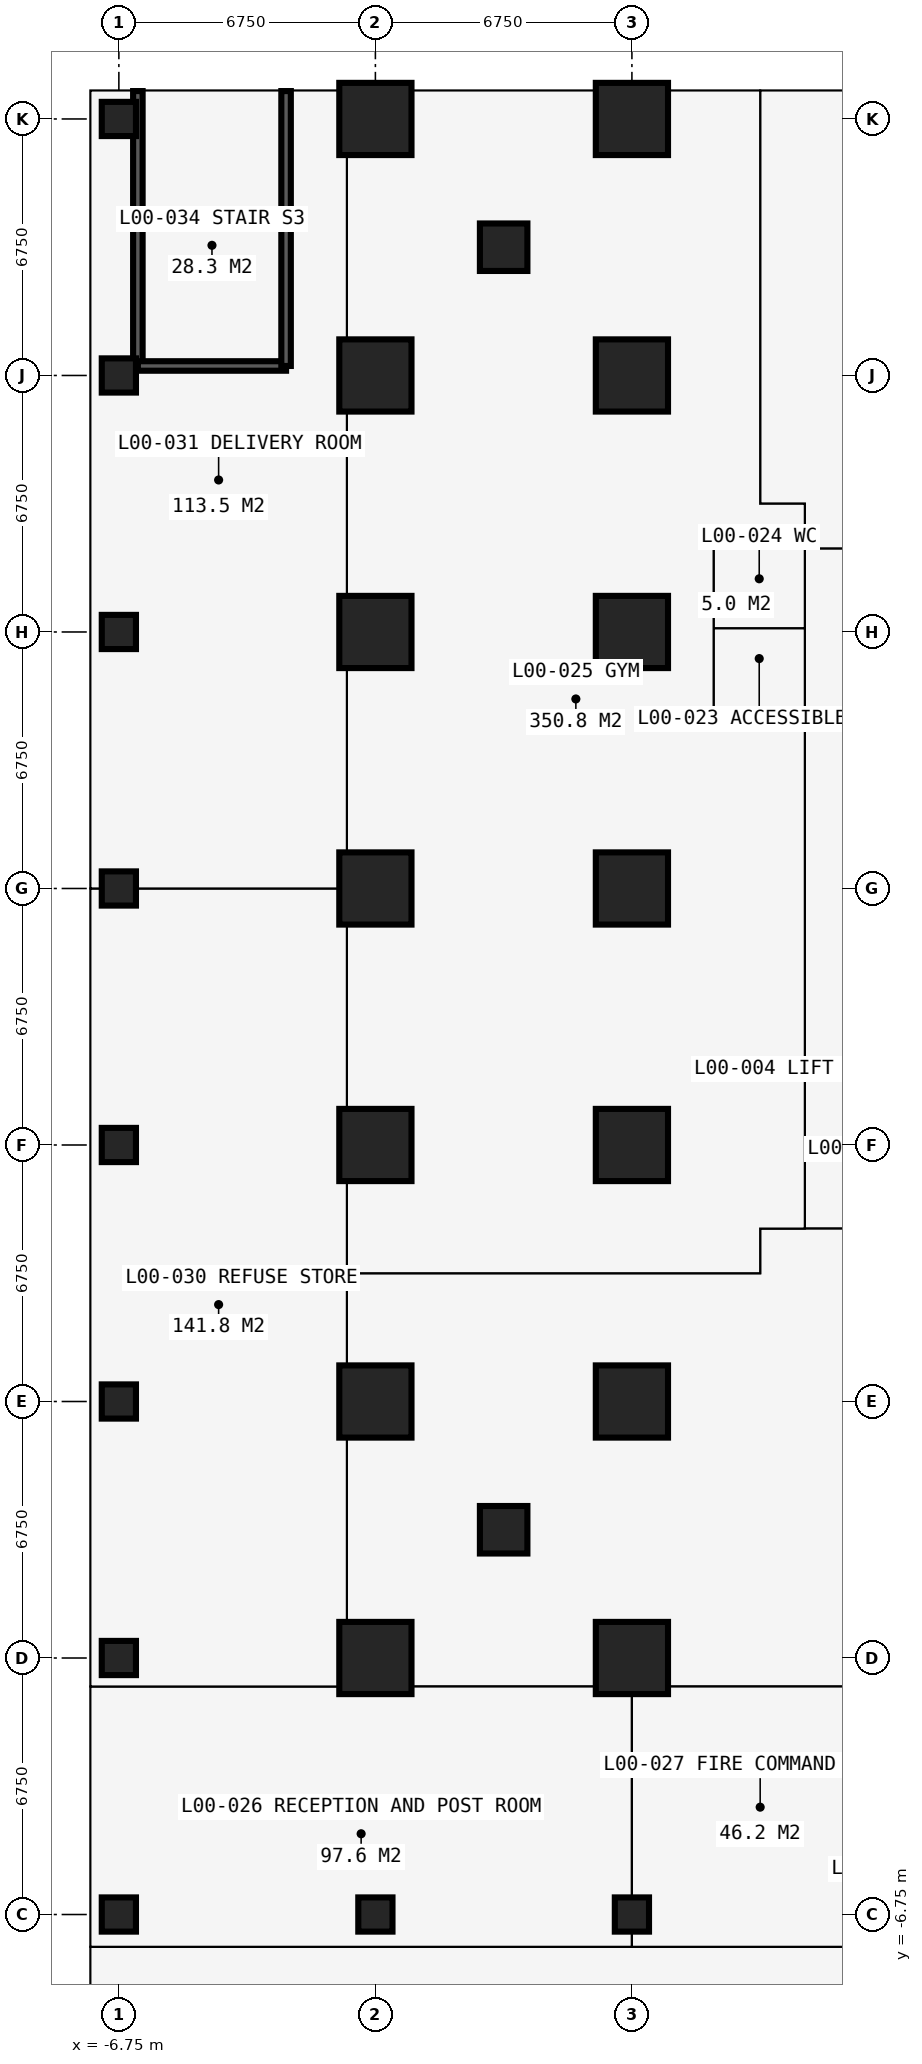
"""IFC4 building model, lengths in metres.
Left out: names, types, materials, properties, quantities, classifications, styles, units other than length and angle.
Written with IfcOpenShell. Run it as: python <this file> out.ifc"""

import sys

from ifc_helpers import new_model, si_unit, direction, frame, frame_2d, origin, origin_2d, place, context, subcontext, project, spatial, rectangle, circle, extrude, element, fill, save


model = new_model("IFC4")
c1 = context("Model", 3, precision=1e-05, world=origin(), true_north=direction((0.0, 1.0)))
c2 = subcontext(c1, "Body", "Model", "MODEL_VIEW")
j1 = project(units=[si_unit("LENGTHUNIT", "METRE"), si_unit("PLANEANGLEUNIT", "RADIAN")], contexts=[c1])
p1 = place(None, origin())
s1 = spatial("IfcSite", under=j1, at=p1, CompositionType="ELEMENT")
p2 = place(p1, origin())
s2 = spatial("IfcBuilding", under=s1, at=p2, CompositionType="ELEMENT")
p3 = place(p2, origin())
s3 = spatial("IfcBuildingStorey", under=s2, at=p3, CompositionType="ELEMENT", Elevation=0.0)
for number, where, z_axis, x_axis in (
    (1, (-6.75, -6.75, 0.0), (0.0, 0.0, 1.0), (1.0, 0.0, 0.0)),
    (2, (-6.75, 0.0, 0.0), (0.0, 0.0, 1.0), (1.0, 0.0, 0.0)),
    (3, (-6.75, 6.75, 0.0), (0.0, 0.0, 1.0), (1.0, 0.0, 0.0)),
    (4, (-6.75, 13.5, 0.0), (0.0, 0.0, 1.0), (1.0, 0.0, 0.0)),
    (5, (-6.75, 20.25, 0.0), (0.0, 0.0, 1.0), (1.0, 0.0, 0.0)),
    (6, (-6.75, 27.0, 0.0), (0.0, 0.0, 1.0), (1.0, 0.0, 0.0)),
    (7, (-6.75, 33.75, 0.0), (0.0, 0.0, 1.0), (1.0, 0.0, 0.0)),
    (8, (-6.75, 40.5, 0.0), (0.0, 0.0, 1.0), (1.0, 0.0, 0.0)),
    (9, (0.0, -6.75, 0.0), (0.0, 0.0, 1.0), (1.0, 0.0, 0.0)),
):
    element("IfcColumn", number, at=place(p3, frame(where, z_axis=z_axis, x_axis=x_axis)), inside=s3, PredefinedType="COLUMN", context=c2, shape_type="SweptSolid", body=[
        extrude(circle(Radius=0.45, at=origin_2d()), origin(), (0.0, 0.0, 1.0), 4.5),
    ])
for number, where, z_axis, x_axis in (
    (10, (0.0, 0.0, 0.0), (0.0, 0.0, 1.0), (1.0, 0.0, 0.0)),
    (11, (0.0, 6.75, 0.0), (0.0, 0.0, 1.0), (1.0, 0.0, 0.0)),
    (12, (0.0, 13.5, 0.0), (0.0, 0.0, 1.0), (1.0, 0.0, 0.0)),
    (13, (0.0, 20.25, 0.0), (0.0, 0.0, 1.0), (1.0, 0.0, 0.0)),
    (14, (0.0, 27.0, 0.0), (0.0, 0.0, 1.0), (1.0, 0.0, 0.0)),
    (15, (0.0, 33.75, 0.0), (0.0, 0.0, 1.0), (1.0, 0.0, 0.0)),
    (16, (0.0, 40.5, 0.0), (0.0, 0.0, 1.0), (1.0, 0.0, 0.0)),
):
    element("IfcColumn", number, at=place(p3, frame(where, z_axis=z_axis, x_axis=x_axis)), inside=s3, PredefinedType="COLUMN", context=c2, shape_type="SweptSolid", body=[
        extrude(rectangle(XDim=1.9, YDim=1.9, at=origin_2d()), origin(), (0.0, 0.0, 1.0), 4.5),
    ])
for number, where, z_axis, x_axis in (
    (17, (3.375, 3.375, 0.0), (0.0, 0.0, 1.0), (1.0, 0.0, 0.0)),
    (18, (3.375, 37.125, 0.0), (0.0, 0.0, 1.0), (1.0, 0.0, 0.0)),
):
    element("IfcColumn", number, at=place(p3, frame(where, z_axis=z_axis, x_axis=x_axis)), inside=s3, PredefinedType="COLUMN", context=c2, shape_type="SweptSolid", body=[
        extrude(rectangle(XDim=1.25, YDim=1.25, at=origin_2d()), origin(), (0.0, 0.0, 1.0), 4.5),
    ])
p4 = place(p3, frame((6.75, -6.75, 0.0), z_axis=(0.0, 0.0, 1.0), x_axis=(1.0, 0.0, 0.0)))
e19 = element("IfcColumn", 19, at=p4, inside=s3, PredefinedType="COLUMN", context=c2, shape_type="SweptSolid", body=[
    extrude(circle(Radius=0.45, at=origin_2d()), origin(), (0.0, 0.0, 1.0), 4.5),
])
for number, where, z_axis, x_axis in (
    (20, (6.75, 0.0, 0.0), (0.0, 0.0, 1.0), (1.0, 0.0, 0.0)),
    (21, (6.75, 6.75, 0.0), (0.0, 0.0, 1.0), (1.0, 0.0, 0.0)),
    (22, (6.75, 13.5, 0.0), (0.0, 0.0, 1.0), (1.0, 0.0, 0.0)),
    (23, (6.75, 20.25, 0.0), (0.0, 0.0, 1.0), (1.0, 0.0, 0.0)),
    (24, (6.75, 27.0, 0.0), (0.0, 0.0, 1.0), (1.0, 0.0, 0.0)),
    (25, (6.75, 33.75, 0.0), (0.0, 0.0, 1.0), (1.0, 0.0, 0.0)),
    (26, (6.75, 40.5, 0.0), (0.0, 0.0, 1.0), (1.0, 0.0, 0.0)),
):
    element("IfcColumn", number, at=place(p3, frame(where, z_axis=z_axis, x_axis=x_axis)), inside=s3, PredefinedType="COLUMN", context=c2, shape_type="SweptSolid", body=[
        extrude(rectangle(XDim=1.9, YDim=1.9, at=origin_2d()), origin(), (0.0, 0.0, 1.0), 4.5),
    ])
p5 = place(p3, frame((-7.5, 6.75, 0.0), z_axis=(0.0, 0.0, 1.0), x_axis=(0.0, 1.0, 0.0)))
e27 = element("IfcWall", 27, at=p5, inside=s3, PredefinedType="SOLIDWALL", context=c2, shape_type="SweptSolid", body=[
    extrude(rectangle(XDim=6.75, YDim=0.15, at=frame_2d((3.375, 0.0))), origin(), (0.0, 0.0, 1.0), 4.25),
])
p6 = place(p5, frame((1.875, 0.0, 0.0)))
e28 = element("IfcOpeningElement", 28, at=p6, cuts=e27, PredefinedType="OPENING", context=c2, shape_type="SweptSolid", body=[
    extrude(rectangle(XDim=3.0, YDim=3.0, at=frame_2d((1.5, 1.5))), frame((0.0, 0.085, 0.0), z_axis=(0.0, -1.0, 0.0), x_axis=(1.0, 0.0, 0.0)), (0.0, 0.0, 1.0), 0.17),
])
p7 = place(p3, frame((-7.5, 27.0, 0.0), z_axis=(0.0, 0.0, 1.0), x_axis=(0.0, 1.0, 0.0)))
e29 = element("IfcWall", 29, at=p7, inside=s3, PredefinedType="SOLIDWALL", context=c2, shape_type="SweptSolid", body=[
    extrude(rectangle(XDim=6.75, YDim=0.15, at=frame_2d((3.375, 0.0))), origin(), (0.0, 0.0, 1.0), 4.25),
])
p8 = place(p7, frame((1.875, 0.0, 0.0)))
e30 = element("IfcOpeningElement", 30, at=p8, cuts=e29, PredefinedType="OPENING", context=c2, shape_type="SweptSolid", body=[
    extrude(rectangle(XDim=3.0, YDim=3.0, at=frame_2d((1.5, 1.5))), frame((0.0, 0.085, 0.0), z_axis=(0.0, -1.0, 0.0), x_axis=(1.0, 0.0, 0.0)), (0.0, 0.0, 1.0), 0.17),
])
p9 = place(p3, frame((-7.484, -7.6, 0.0), z_axis=(0.0, 0.0, 1.0), x_axis=(1.0, 0.0, 0.0)))
e31 = element("IfcWall", 31, at=p9, inside=s3, PredefinedType="PARTITIONING", context=c2, shape_type="SweptSolid", body=[
    extrude(rectangle(XDim=20.984, YDim=0.15, at=frame_2d((10.492, 0.0))), origin(), (0.0, 0.0, 1.0), 4.25),
])
p10 = place(p3, frame((-7.484, -0.75, 0.0), z_axis=(0.0, 0.0, 1.0), x_axis=(1.0, 0.0, 0.0)))
e32 = element("IfcWall", 32, at=p10, inside=s3, PredefinedType="PARTITIONING", context=c2, shape_type="SweptSolid", body=[
    extrude(rectangle(XDim=20.984, YDim=0.15, at=frame_2d((10.492, 0.0))), origin(), (0.0, 0.0, 1.0), 4.25),
])
p11 = place(p10, frame((9.684, 0.0, 0.0)))
e33 = element("IfcOpeningElement", 33, at=p11, cuts=e32, PredefinedType="OPENING", context=c2, shape_type="SweptSolid", body=[
    extrude(rectangle(XDim=1.6, YDim=2.4, at=frame_2d((0.8, 1.2))), frame((0.0, 0.085, 0.0), z_axis=(0.0, -1.0, 0.0), x_axis=(1.0, 0.0, 0.0)), (0.0, 0.0, 1.0), 0.17),
])
p12 = place(p3, frame((-7.484, 20.25, 0.0), z_axis=(0.0, 0.0, 1.0), x_axis=(1.0, 0.0, 0.0)))
e34 = element("IfcWall", 34, at=p12, inside=s3, PredefinedType="PARTITIONING", context=c2, shape_type="SweptSolid", body=[
    extrude(rectangle(XDim=6.734, YDim=0.15, at=frame_2d((3.367, 0.0))), origin(), (0.0, 0.0, 1.0), 3.752),
])
p13 = place(p3, frame((-6.25, 34.0, 0.0), z_axis=(0.0, 0.0, 1.0), x_axis=(0.0, 1.0, 0.0)))
e35 = element("IfcWall", 35, at=p13, inside=s3, PredefinedType="SOLIDWALL", context=c2, shape_type="SweptSolid", body=[
    extrude(rectangle(XDim=7.234, YDim=0.25, at=frame_2d((3.617, 0.0))), origin(), (0.0, 0.0, 1.0), 4.25),
])
p14 = place(p3, frame((-6.25, 34.0, 0.0), z_axis=(0.0, 0.0, 1.0), x_axis=(1.0, 0.0, 0.0)))
e36 = element("IfcWall", 36, at=p14, inside=s3, PredefinedType="SOLIDWALL", context=c2, shape_type="SweptSolid", body=[
    extrude(rectangle(XDim=3.9, YDim=0.25, at=frame_2d((1.95, 0.0))), origin(), (0.0, 0.0, 1.0), 4.25),
])
p15 = place(p3, frame((-2.35, 34.0, 0.0), z_axis=(0.0, 0.0, 1.0), x_axis=(0.0, 1.0, 0.0)))
e37 = element("IfcWall", 37, at=p15, inside=s3, PredefinedType="SOLIDWALL", context=c2, shape_type="SweptSolid", body=[
    extrude(rectangle(XDim=7.234, YDim=0.25, at=frame_2d((3.617, 0.0))), origin(), (0.0, 0.0, 1.0), 4.25),
])
p16 = place(p3, frame((-0.75, -0.75, 0.0), z_axis=(0.0, 0.0, 1.0), x_axis=(0.0, 1.0, 0.0)))
e38 = element("IfcWall", 38, at=p16, inside=s3, PredefinedType="PARTITIONING", context=c2, shape_type="SweptSolid", body=[
    extrude(rectangle(XDim=41.984, YDim=0.15, at=frame_2d((20.992, 0.0))), origin(), (0.0, 0.0, 1.0), 4.25),
])
p17 = place(p16, frame((4.95, 0.0, 0.0)))
e39 = element("IfcOpeningElement", 39, at=p17, cuts=e38, PredefinedType="OPENING", context=c2, shape_type="SweptSolid", body=[
    extrude(rectangle(XDim=0.95, YDim=2.2, at=frame_2d((0.475, 1.1))), frame((0.0, 0.085, 0.0), z_axis=(0.0, -1.0, 0.0), x_axis=(1.0, 0.0, 0.0)), (0.0, 0.0, 1.0), 0.17),
])
p18 = place(p16, frame((31.0, 0.0, 0.0)))
e40 = element("IfcOpeningElement", 40, at=p18, cuts=e38, PredefinedType="OPENING", context=c2, shape_type="SweptSolid", body=[
    extrude(rectangle(XDim=0.95, YDim=2.2, at=frame_2d((0.475, 1.1))), frame((0.0, 0.085, 0.0), z_axis=(0.0, -1.0, 0.0), x_axis=(1.0, 0.0, 0.0)), (0.0, 0.0, 1.0), 0.17),
])
p19 = place(p3, frame((-0.75, 10.125, 0.0), z_axis=(0.0, 0.0, 1.0), x_axis=(1.0, 0.0, 0.0)))
e41 = element("IfcWall", 41, at=p19, inside=s3, PredefinedType="PARTITIONING", context=c2, shape_type="SweptSolid", body=[
    extrude(rectangle(XDim=10.875, YDim=0.15, at=frame_2d((5.438, 0.0))), origin(), (0.0, 0.0, 1.0), 4.25),
])
p20 = place(p3, frame((6.75, -7.6, 0.0), z_axis=(0.0, 0.0, 1.0), x_axis=(0.0, 1.0, 0.0)))
e42 = element("IfcWall", 42, at=p20, inside=s3, PredefinedType="PARTITIONING", context=c2, shape_type="SweptSolid", body=[
    extrude(rectangle(XDim=6.85, YDim=0.15, at=frame_2d((3.425, 0.0))), origin(), (0.0, 0.0, 1.0), 3.752),
])
p21 = place(p3, frame((8.9, 25.0, 0.0), z_axis=(0.0, 0.0, 1.0), x_axis=(0.0, 1.0, 0.0)))
e43 = element("IfcWall", 43, at=p21, inside=s3, PredefinedType="PARTITIONING", context=c2, shape_type="SweptSolid", body=[
    extrude(rectangle(XDim=4.2, YDim=0.15, at=frame_2d((2.1, 0.0))), origin(), (0.0, 0.0, 1.0), 4.25),
])
p22 = place(p3, frame((8.9, 25.0, 0.0), z_axis=(0.0, 0.0, 1.0), x_axis=(1.0, 0.0, 0.0)))
e44 = element("IfcWall", 44, at=p22, inside=s3, PredefinedType="PARTITIONING", context=c2, shape_type="SweptSolid", body=[
    extrude(rectangle(XDim=2.4, YDim=0.1, at=frame_2d((1.2, 0.0))), origin(), (0.0, 0.0, 1.0), 4.25),
])
p23 = place(p3, frame((8.9, 27.1, 0.0), z_axis=(0.0, 0.0, 1.0), x_axis=(1.0, 0.0, 0.0)))
e45 = element("IfcWall", 45, at=p23, inside=s3, PredefinedType="PARTITIONING", context=c2, shape_type="SweptSolid", body=[
    extrude(rectangle(XDim=2.4, YDim=0.1, at=frame_2d((1.2, 0.0))), origin(), (0.0, 0.0, 1.0), 3.752),
])
p24 = place(p3, frame((8.9, 29.2, 0.0), z_axis=(0.0, 0.0, 1.0), x_axis=(1.0, 0.0, 0.0)))
e46 = element("IfcWall", 46, at=p24, inside=s3, PredefinedType="PARTITIONING", context=c2, shape_type="SweptSolid", body=[
    extrude(rectangle(XDim=21.475, YDim=0.15, at=frame_2d((10.738, 0.0))), origin(), (0.0, 0.0, 1.0), 4.25),
])
p25 = place(p24, frame((10.55, 0.0, 0.0)))
e47 = element("IfcOpeningElement", 47, at=p25, cuts=e46, PredefinedType="OPENING", context=c2, shape_type="SweptSolid", body=[
    extrude(rectangle(XDim=1.6, YDim=2.4, at=frame_2d((0.8, 1.2))), frame((0.0, 0.085, 0.0), z_axis=(0.0, -1.0, 0.0), x_axis=(1.0, 0.0, 0.0)), (0.0, 0.0, 1.0), 0.17),
])
p26 = place(p3, frame((10.125, 10.125, 0.0), z_axis=(0.0, 0.0, 1.0), x_axis=(0.0, 1.0, 0.0)))
e48 = element("IfcWall", 48, at=p26, inside=s3, PredefinedType="PARTITIONING", context=c2, shape_type="SweptSolid", body=[
    extrude(rectangle(XDim=1.175, YDim=0.15, at=frame_2d((0.587, 0.0))), origin(), (0.0, 0.0, 1.0), 4.25),
])
p27 = place(p3, frame((10.125, 11.3, 0.0), z_axis=(0.0, 0.0, 1.0), x_axis=(1.0, 0.0, 0.0)))
e49 = element("IfcWall", 49, at=p27, inside=s3, PredefinedType="PARTITIONING", context=c2, shape_type="SweptSolid", body=[
    extrude(rectangle(XDim=20.675, YDim=0.15, at=frame_2d((10.337, 0.0))), origin(), (0.0, 0.0, 1.0), 4.25),
])
p28 = place(p27, frame((9.325, 0.0, 0.0)))
e50 = element("IfcOpeningElement", 50, at=p28, cuts=e49, PredefinedType="OPENING", context=c2, shape_type="SweptSolid", body=[
    extrude(rectangle(XDim=1.6, YDim=2.4, at=frame_2d((0.8, 1.2))), frame((0.0, 0.085, 0.0), z_axis=(0.0, -1.0, 0.0), x_axis=(1.0, 0.0, 0.0)), (0.0, 0.0, 1.0), 0.17),
])
p29 = place(p3, frame((10.125, 30.375, 0.0), z_axis=(0.0, 0.0, 1.0), x_axis=(0.0, 1.0, 0.0)))
e51 = element("IfcWall", 51, at=p29, inside=s3, PredefinedType="PARTITIONING", context=c2, shape_type="SweptSolid", body=[
    extrude(rectangle(XDim=10.859, YDim=0.15, at=frame_2d((5.429, 0.0))), origin(), (0.0, 0.0, 1.0), 4.25),
])
p30 = place(p3, frame((10.125, 30.375, 0.0), z_axis=(0.0, 0.0, 1.0), x_axis=(1.0, 0.0, 0.0)))
e52 = element("IfcWall", 52, at=p30, inside=s3, PredefinedType="PARTITIONING", context=c2, shape_type="SweptSolid", body=[
    extrude(rectangle(XDim=1.175, YDim=0.15, at=frame_2d((0.587, 0.0))), origin(), (0.0, 0.0, 1.0), 4.25),
])
p31 = place(p3, frame((11.3, 11.3, 0.0), z_axis=(0.0, 0.0, 1.0), x_axis=(0.0, 1.0, 0.0)))
e53 = element("IfcWall", 53, at=p31, inside=s3, PredefinedType="PARTITIONING", context=c2, shape_type="SweptSolid", body=[
    extrude(rectangle(XDim=19.075, YDim=0.15, at=frame_2d((9.538, 0.0))), origin(), (0.0, 0.0, 1.0), 4.25),
])
p32 = place(p31, frame((14.25, 0.0, 0.0)))
e54 = element("IfcOpeningElement", 54, at=p32, cuts=e53, PredefinedType="OPENING", context=c2, shape_type="SweptSolid", body=[
    extrude(rectangle(XDim=1.0, YDim=2.2, at=frame_2d((0.5, 1.1))), frame((0.0, 0.085, 0.0), z_axis=(0.0, -1.0, 0.0), x_axis=(1.0, 0.0, 0.0)), (0.0, 0.0, 1.0), 0.17),
])
p33 = place(p31, frame((16.35, 0.0, 0.0)))
e55 = element("IfcOpeningElement", 55, at=p33, cuts=e53, PredefinedType="OPENING", context=c2, shape_type="SweptSolid", body=[
    extrude(rectangle(XDim=1.0, YDim=2.2, at=frame_2d((0.5, 1.1))), frame((0.0, 0.085, 0.0), z_axis=(0.0, -1.0, 0.0), x_axis=(1.0, 0.0, 0.0)), (0.0, 0.0, 1.0), 0.17),
])
p34 = place(p31, frame((6.05, 0.0, 0.0)))
e56 = element("IfcOpeningElement", 56, at=p34, cuts=e53, PredefinedType="OPENING", context=c2, shape_type="SweptSolid", body=[
    extrude(rectangle(XDim=1.6, YDim=2.4, at=frame_2d((0.8, 1.2))), frame((0.0, 0.085, 0.0), z_axis=(0.0, -1.0, 0.0), x_axis=(1.0, 0.0, 0.0)), (0.0, 0.0, 1.0), 0.17),
])
p35 = place(p6, origin())
e57 = element("IfcDoor", 57, at=p35, inside=s3, OperationType="ROLLINGUP", PredefinedType="DOOR", context=c2, shape_type="SweptSolid", body=[
    extrude(rectangle(XDim=3.0, YDim=3.0, at=frame_2d((1.5, 1.5))), frame((0.0, 0.025, 0.0), z_axis=(0.0, -1.0, 0.0), x_axis=(1.0, 0.0, 0.0)), (0.0, 0.0, 1.0), 0.05),
])
fill(e28, e57)
p36 = place(p8, origin())
e58 = element("IfcDoor", 58, at=p36, inside=s3, OperationType="ROLLINGUP", PredefinedType="DOOR", context=c2, shape_type="SweptSolid", body=[
    extrude(rectangle(XDim=3.0, YDim=3.0, at=frame_2d((1.5, 1.5))), frame((0.0, 0.025, 0.0), z_axis=(0.0, -1.0, 0.0), x_axis=(1.0, 0.0, 0.0)), (0.0, 0.0, 1.0), 0.05),
])
fill(e30, e58)
p37 = place(p32, origin())
e59 = element("IfcDoor", 59, at=p37, inside=s3, OperationType="SINGLE_SWING_LEFT", PredefinedType="DOOR", context=c2, shape_type="SweptSolid", body=[
    extrude(rectangle(XDim=1.0, YDim=2.2, at=frame_2d((0.5, 1.1))), frame((0.0, 0.025, 0.0), z_axis=(0.0, -1.0, 0.0), x_axis=(1.0, 0.0, 0.0)), (0.0, 0.0, 1.0), 0.05),
])
fill(e54, e59)
p38 = place(p33, origin())
e60 = element("IfcDoor", 60, at=p38, inside=s3, OperationType="SINGLE_SWING_LEFT", PredefinedType="DOOR", context=c2, shape_type="SweptSolid", body=[
    extrude(rectangle(XDim=1.0, YDim=2.2, at=frame_2d((0.5, 1.1))), frame((0.0, 0.025, 0.0), z_axis=(0.0, -1.0, 0.0), x_axis=(1.0, 0.0, 0.0)), (0.0, 0.0, 1.0), 0.05),
])
fill(e55, e60)
p39 = place(p34, origin())
e61 = element("IfcDoor", 61, at=p39, inside=s3, OperationType="DOUBLE_DOOR_SINGLE_SWING", PredefinedType="DOOR", context=c2, shape_type="SweptSolid", body=[
    extrude(rectangle(XDim=1.6, YDim=2.4, at=frame_2d((0.8, 1.2))), frame((0.0, 0.025, 0.0), z_axis=(0.0, -1.0, 0.0), x_axis=(1.0, 0.0, 0.0)), (0.0, 0.0, 1.0), 0.05),
])
fill(e56, e61)
p40 = place(p11, origin())
e62 = element("IfcDoor", 62, at=p40, inside=s3, OperationType="DOUBLE_DOOR_SINGLE_SWING", PredefinedType="DOOR", context=c2, shape_type="SweptSolid", body=[
    extrude(rectangle(XDim=1.6, YDim=2.4, at=frame_2d((0.8, 1.2))), frame((0.0, 0.025, 0.0), z_axis=(0.0, -1.0, 0.0), x_axis=(1.0, 0.0, 0.0)), (0.0, 0.0, 1.0), 0.05),
])
fill(e33, e62)
p41 = place(p17, origin())
e63 = element("IfcDoor", 63, at=p41, inside=s3, OperationType="SINGLE_SWING_LEFT", PredefinedType="DOOR", context=c2, shape_type="SweptSolid", body=[
    extrude(rectangle(XDim=0.95, YDim=2.2, at=frame_2d((0.475, 1.1))), frame((0.0, 0.025, 0.0), z_axis=(0.0, -1.0, 0.0), x_axis=(1.0, 0.0, 0.0)), (0.0, 0.0, 1.0), 0.05),
])
fill(e39, e63)
p42 = place(p18, origin())
e64 = element("IfcDoor", 64, at=p42, inside=s3, OperationType="SINGLE_SWING_LEFT", PredefinedType="DOOR", context=c2, shape_type="SweptSolid", body=[
    extrude(rectangle(XDim=0.95, YDim=2.2, at=frame_2d((0.475, 1.1))), frame((0.0, 0.025, 0.0), z_axis=(0.0, -1.0, 0.0), x_axis=(1.0, 0.0, 0.0)), (0.0, 0.0, 1.0), 0.05),
])
fill(e40, e64)
save(model, sys.argv[1])
